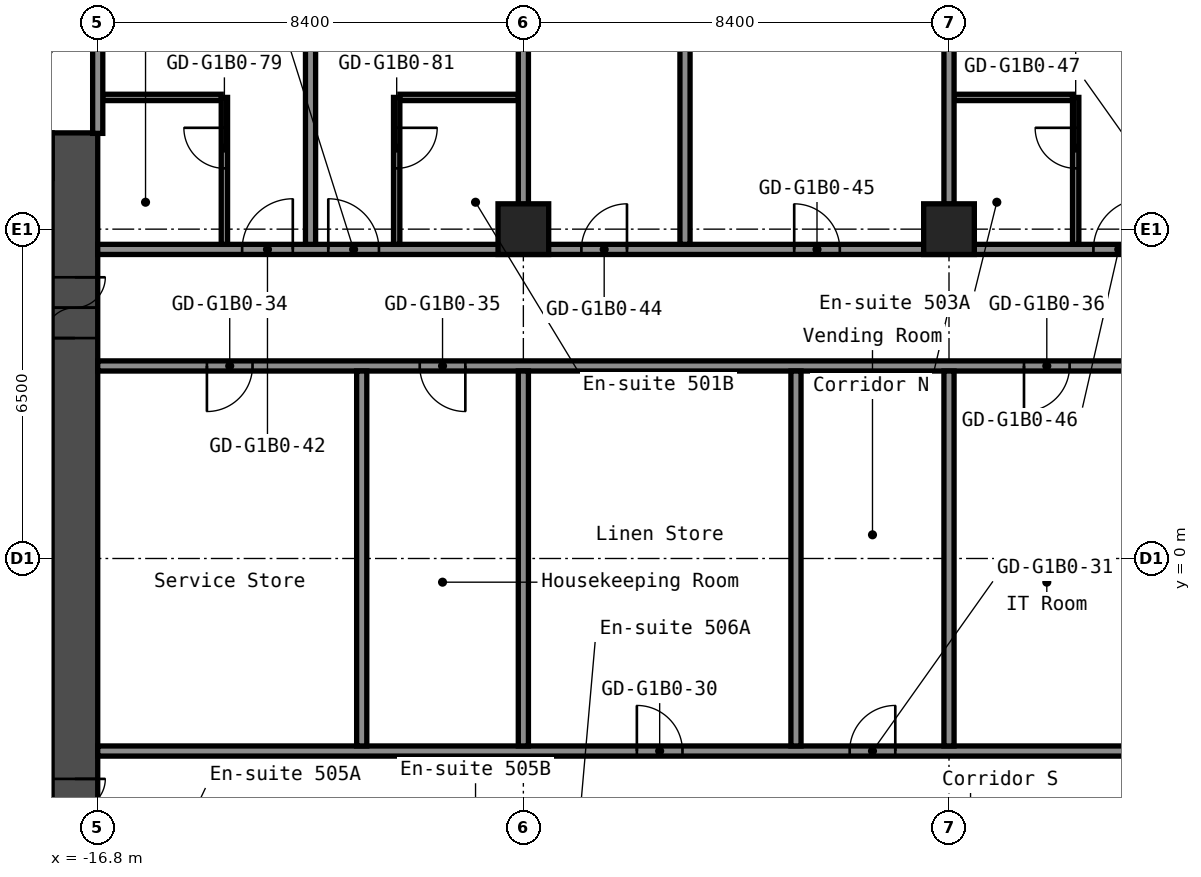
"""IFC4 building model, lengths in metres.
Left out: names, types, materials, properties, quantities, classifications, styles, units other than length and angle.
Written with IfcOpenShell. Run it as: python <this file> out.ifc"""

import sys

from ifc_helpers import new_model, si_unit, direction, frame, frame_2d, origin, origin_2d, place, context, subcontext, project, spatial, rectangle, hollow_rectangle, extrude, element, fill, save


model = new_model("IFC4")
c1 = context("Model", 3, precision=1e-05, world=origin(), true_north=direction((0.0, 1.0)))
c2 = subcontext(c1, "Body", "Model", "MODEL_VIEW")
j1 = project(units=[si_unit("LENGTHUNIT", "METRE"), si_unit("PLANEANGLEUNIT", "RADIAN")], contexts=[c1])
p1 = place(None, origin())
s1 = spatial("IfcSite", under=j1, at=p1, CompositionType="ELEMENT")
p2 = place(p1, origin())
s2 = spatial("IfcBuilding", under=s1, at=p2, CompositionType="ELEMENT")
p3 = place(p2, frame((0.0, 0.0, 23.0)))
s3 = spatial("IfcBuildingStorey", under=s2, at=p3, CompositionType="ELEMENT", Elevation=23.0)
for number, where, z_axis, x_axis in (
    (1, (-8.4, 6.5, 0.0), (0.0, 0.0, 1.0), (1.0, 0.0, 0.0)),
    (2, (0.0, 6.5, 0.0), (0.0, 0.0, 1.0), (1.0, 0.0, 0.0)),
):
    element("IfcColumn", number, at=place(p3, frame(where, z_axis=z_axis, x_axis=x_axis)), inside=s3, PredefinedType="COLUMN", context=c2, shape_type="SweptSolid", body=[
        extrude(hollow_rectangle(XDim=1.0, YDim=1.0, WallThickness=0.04, at=origin_2d()), origin(), (0.0, 0.0, 1.0), 2.8),
    ])
p4 = place(p3, frame((-17.25, -8.4, 0.0), z_axis=(0.0, 0.0, 1.0), x_axis=(0.0, 1.0, 0.0)))
e3 = element("IfcWall", 3, at=p4, inside=s3, PredefinedType="SHEAR", context=c2, shape_type="SweptSolid", body=[
    extrude(rectangle(XDim=16.8, YDim=0.9, at=frame_2d((8.4, 0.0))), origin(), (0.0, 0.0, 1.0), 2.8),
])
p5 = place(p4, frame((12.75, 0.0, 0.0)))
e4 = element("IfcOpeningElement", 4, at=p5, cuts=e3, PredefinedType="OPENING", context=c2, shape_type="SweptSolid", body=[
    extrude(rectangle(XDim=1.2, YDim=2.1, at=frame_2d((0.6, 1.05))), frame((0.0, 0.46, 0.0), z_axis=(0.0, -1.0, 0.0), x_axis=(1.0, 0.0, 0.0)), (0.0, 0.0, 1.0), 0.92),
])
p6 = place(p4, frame((2.85, 0.0, 0.0)))
e5 = element("IfcOpeningElement", 5, at=p6, cuts=e3, PredefinedType="OPENING", context=c2, shape_type="SweptSolid", body=[
    extrude(rectangle(XDim=1.2, YDim=2.1, at=frame_2d((0.6, 1.05))), frame((0.0, 0.46, 0.0), z_axis=(0.0, -1.0, 0.0), x_axis=(1.0, 0.0, 0.0)), (0.0, 0.0, 1.0), 0.92),
])
p7 = place(p3, frame((-32.7, 7.95, 0.0), z_axis=(0.0, 0.0, 1.0), x_axis=(1.0, 0.0, 0.0)))
e6 = element("IfcWall", 6, at=p7, inside=s3, PredefinedType="SHEAR", context=c2, shape_type="SweptSolid", body=[
    extrude(rectangle(XDim=15.0, YDim=0.9, at=frame_2d((7.5, 0.0))), origin(), (0.0, 0.0, 1.0), 2.8),
])
p8 = place(p7, frame((3.4, 0.0, 0.0)))
e7 = element("IfcOpeningElement", 7, at=p8, cuts=e6, PredefinedType="OPENING", context=c2, shape_type="SweptSolid", body=[
    extrude(rectangle(XDim=1.2, YDim=2.1, at=frame_2d((0.6, 1.05))), frame((0.0, 0.46, 0.0), z_axis=(0.0, -1.0, 0.0), x_axis=(1.0, 0.0, 0.0)), (0.0, 0.0, 1.0), 0.92),
])
p9 = place(p7, frame((0.75, 0.0, 0.0)))
e8 = element("IfcOpeningElement", 8, at=p9, cuts=e6, PredefinedType="OPENING", context=c2, shape_type="SweptSolid", body=[
    extrude(rectangle(XDim=0.9, YDim=2.1, at=frame_2d((0.45, 1.05))), frame((0.0, 0.46, 0.0), z_axis=(0.0, -1.0, 0.0), x_axis=(1.0, 0.0, 0.0)), (0.0, 0.0, 1.0), 0.92),
])
p10 = place(p3, frame((-16.8, -3.8, 0.0), z_axis=(0.0, 0.0, 1.0), x_axis=(1.0, 0.0, 0.0)))
e9 = element("IfcWall", 9, at=p10, inside=s3, PredefinedType="PARTITIONING", context=c2, shape_type="SweptSolid", body=[
    extrude(rectangle(XDim=33.6, YDim=0.2, at=frame_2d((16.8, 0.0))), origin(), (0.0, 0.0, 1.0), 2.8),
])
p11 = place(p10, frame((10.64, 0.0, 0.0)))
e10 = element("IfcOpeningElement", 10, at=p11, cuts=e9, PredefinedType="OPENING", context=c2, shape_type="SweptSolid", body=[
    extrude(rectangle(XDim=0.9, YDim=2.1, at=frame_2d((0.45, 1.05))), frame((0.0, 0.11, 0.0), z_axis=(0.0, -1.0, 0.0), x_axis=(1.0, 0.0, 0.0)), (0.0, 0.0, 1.0), 0.22),
])
p12 = place(p10, frame((14.84, 0.0, 0.0)))
e11 = element("IfcOpeningElement", 11, at=p12, cuts=e9, PredefinedType="OPENING", context=c2, shape_type="SweptSolid", body=[
    extrude(rectangle(XDim=0.9, YDim=2.1, at=frame_2d((0.45, 1.05))), frame((0.0, 0.11, 0.0), z_axis=(0.0, -1.0, 0.0), x_axis=(1.0, 0.0, 0.0)), (0.0, 0.0, 1.0), 0.22),
])
p13 = place(p10, frame((26.26, 0.0, 0.0)))
e12 = element("IfcOpeningElement", 12, at=p13, cuts=e9, PredefinedType="OPENING", context=c2, shape_type="SweptSolid", body=[
    extrude(rectangle(XDim=0.9, YDim=2.1, at=frame_2d((0.45, 1.05))), frame((0.0, 0.11, 0.0), z_axis=(0.0, -1.0, 0.0), x_axis=(1.0, 0.0, 0.0)), (0.0, 0.0, 1.0), 0.22),
])
p14 = place(p10, frame((30.46, 0.0, 0.0)))
e13 = element("IfcOpeningElement", 13, at=p14, cuts=e9, PredefinedType="OPENING", context=c2, shape_type="SweptSolid", body=[
    extrude(rectangle(XDim=0.9, YDim=2.1, at=frame_2d((0.45, 1.05))), frame((0.0, 0.11, 0.0), z_axis=(0.0, -1.0, 0.0), x_axis=(1.0, 0.0, 0.0)), (0.0, 0.0, 1.0), 0.22),
])
p15 = place(p3, frame((-16.8, 3.8, 0.0), z_axis=(0.0, 0.0, 1.0), x_axis=(1.0, 0.0, 0.0)))
e14 = element("IfcWall", 14, at=p15, inside=s3, PredefinedType="PARTITIONING", context=c2, shape_type="SweptSolid", body=[
    extrude(rectangle(XDim=33.6, YDim=0.2, at=frame_2d((16.8, 0.0))), origin(), (0.0, 0.0, 1.0), 2.8),
])
p16 = place(p15, frame((2.155, 0.0, 0.0)))
e15 = element("IfcOpeningElement", 15, at=p16, cuts=e14, PredefinedType="OPENING", context=c2, shape_type="SweptSolid", body=[
    extrude(rectangle(XDim=0.9, YDim=2.1, at=frame_2d((0.45, 1.05))), frame((0.0, 0.11, 0.0), z_axis=(0.0, -1.0, 0.0), x_axis=(1.0, 0.0, 0.0)), (0.0, 0.0, 1.0), 0.22),
])
p17 = place(p15, frame((6.355, 0.0, 0.0)))
e16 = element("IfcOpeningElement", 16, at=p17, cuts=e14, PredefinedType="OPENING", context=c2, shape_type="SweptSolid", body=[
    extrude(rectangle(XDim=0.9, YDim=2.1, at=frame_2d((0.45, 1.05))), frame((0.0, 0.11, 0.0), z_axis=(0.0, -1.0, 0.0), x_axis=(1.0, 0.0, 0.0)), (0.0, 0.0, 1.0), 0.22),
])
p18 = place(p15, frame((18.28, 0.0, 0.0)))
e17 = element("IfcOpeningElement", 17, at=p18, cuts=e14, PredefinedType="OPENING", context=c2, shape_type="SweptSolid", body=[
    extrude(rectangle(XDim=0.9, YDim=2.1, at=frame_2d((0.45, 1.05))), frame((0.0, 0.11, 0.0), z_axis=(0.0, -1.0, 0.0), x_axis=(1.0, 0.0, 0.0)), (0.0, 0.0, 1.0), 0.22),
])
p19 = place(p15, frame((22.48, 0.0, 0.0)))
e18 = element("IfcOpeningElement", 18, at=p19, cuts=e14, PredefinedType="OPENING", context=c2, shape_type="SweptSolid", body=[
    extrude(rectangle(XDim=0.9, YDim=2.1, at=frame_2d((0.45, 1.05))), frame((0.0, 0.11, 0.0), z_axis=(0.0, -1.0, 0.0), x_axis=(1.0, 0.0, 0.0)), (0.0, 0.0, 1.0), 0.22),
])
p20 = place(p3, frame((-16.8, 6.1, 0.0), z_axis=(0.0, 0.0, 1.0), x_axis=(1.0, 0.0, 0.0)))
e19 = element("IfcWall", 19, at=p20, inside=s3, PredefinedType="PARTITIONING", context=c2, shape_type="SweptSolid", body=[
    extrude(rectangle(XDim=33.6, YDim=0.2, at=frame_2d((16.8, 0.0))), origin(), (0.0, 0.0, 1.0), 2.8),
])
p21 = place(p20, frame((2.85, 0.0, 0.0)))
e20 = element("IfcOpeningElement", 20, at=p21, cuts=e19, PredefinedType="OPENING", context=c2, shape_type="SweptSolid", body=[
    extrude(rectangle(XDim=1.0, YDim=2.1, at=frame_2d((0.5, 1.05))), frame((0.0, 0.11, 0.0), z_axis=(0.0, -1.0, 0.0), x_axis=(1.0, 0.0, 0.0)), (0.0, 0.0, 1.0), 0.22),
])
p22 = place(p20, frame((4.55, 0.0, 0.0)))
e21 = element("IfcOpeningElement", 21, at=p22, cuts=e19, PredefinedType="OPENING", context=c2, shape_type="SweptSolid", body=[
    extrude(rectangle(XDim=1.0, YDim=2.1, at=frame_2d((0.5, 1.05))), frame((0.0, 0.11, 0.0), z_axis=(0.0, -1.0, 0.0), x_axis=(1.0, 0.0, 0.0)), (0.0, 0.0, 1.0), 0.22),
])
p23 = place(p20, frame((9.545, 0.0, 0.0)))
e22 = element("IfcOpeningElement", 22, at=p23, cuts=e19, PredefinedType="OPENING", context=c2, shape_type="SweptSolid", body=[
    extrude(rectangle(XDim=0.9, YDim=2.1, at=frame_2d((0.45, 1.05))), frame((0.0, 0.11, 0.0), z_axis=(0.0, -1.0, 0.0), x_axis=(1.0, 0.0, 0.0)), (0.0, 0.0, 1.0), 0.22),
])
p24 = place(p20, frame((13.745, 0.0, 0.0)))
e23 = element("IfcOpeningElement", 23, at=p24, cuts=e19, PredefinedType="OPENING", context=c2, shape_type="SweptSolid", body=[
    extrude(rectangle(XDim=0.9, YDim=2.1, at=frame_2d((0.45, 1.05))), frame((0.0, 0.11, 0.0), z_axis=(0.0, -1.0, 0.0), x_axis=(1.0, 0.0, 0.0)), (0.0, 0.0, 1.0), 0.22),
])
p25 = place(p20, frame((19.65, 0.0, 0.0)))
e24 = element("IfcOpeningElement", 24, at=p25, cuts=e19, PredefinedType="OPENING", context=c2, shape_type="SweptSolid", body=[
    extrude(rectangle(XDim=1.0, YDim=2.1, at=frame_2d((0.5, 1.05))), frame((0.0, 0.11, 0.0), z_axis=(0.0, -1.0, 0.0), x_axis=(1.0, 0.0, 0.0)), (0.0, 0.0, 1.0), 0.22),
])
p26 = place(p20, frame((21.35, 0.0, 0.0)))
e25 = element("IfcOpeningElement", 25, at=p26, cuts=e19, PredefinedType="OPENING", context=c2, shape_type="SweptSolid", body=[
    extrude(rectangle(XDim=1.0, YDim=2.1, at=frame_2d((0.5, 1.05))), frame((0.0, 0.11, 0.0), z_axis=(0.0, -1.0, 0.0), x_axis=(1.0, 0.0, 0.0)), (0.0, 0.0, 1.0), 0.22),
])
p27 = place(p20, frame((28.05, 0.0, 0.0)))
e26 = element("IfcOpeningElement", 26, at=p27, cuts=e19, PredefinedType="OPENING", context=c2, shape_type="SweptSolid", body=[
    extrude(rectangle(XDim=1.0, YDim=2.1, at=frame_2d((0.5, 1.05))), frame((0.0, 0.11, 0.0), z_axis=(0.0, -1.0, 0.0), x_axis=(1.0, 0.0, 0.0)), (0.0, 0.0, 1.0), 0.22),
])
p28 = place(p20, frame((29.75, 0.0, 0.0)))
e27 = element("IfcOpeningElement", 27, at=p28, cuts=e19, PredefinedType="OPENING", context=c2, shape_type="SweptSolid", body=[
    extrude(rectangle(XDim=1.0, YDim=2.1, at=frame_2d((0.5, 1.05))), frame((0.0, 0.11, 0.0), z_axis=(0.0, -1.0, 0.0), x_axis=(1.0, 0.0, 0.0)), (0.0, 0.0, 1.0), 0.22),
])
for number, where, z_axis, x_axis in (
    (28, (-16.7, 9.1, 0.0), (0.0, 0.0, 1.0), (1.0, 0.0, 0.0)),
    (29, (-10.837, 9.1, 0.0), (0.0, 0.0, 1.0), (1.0, 0.0, 0.0)),
    (30, (0.1, 9.1, 0.0), (0.0, 0.0, 1.0), (1.0, 0.0, 0.0)),
):
    element("IfcWall", number, at=place(p3, frame(where, z_axis=z_axis, x_axis=x_axis)), inside=s3, PredefinedType="PARTITIONING", context=c2, shape_type="SweptSolid", body=[
        extrude(rectangle(XDim=2.337, YDim=0.125, at=frame_2d((1.169, 0.0))), origin(), (0.0, 0.0, 1.0), 2.8),
    ])
p29 = place(p3, frame((-16.8, 8.39, 0.0), z_axis=(0.0, 0.0, 1.0), x_axis=(0.0, 1.0, 0.0)))
e31 = element("IfcWall", 31, at=p29, inside=s3, PredefinedType="PARTITIONING", context=c2, shape_type="SweptSolid", body=[
    extrude(rectangle(XDim=11.91, YDim=0.2, at=frame_2d((5.955, 0.0))), origin(), (0.0, 0.0, 1.0), 2.8),
])
p30 = place(p3, frame((-14.3, 6.2, 0.0), z_axis=(0.0, 0.0, 1.0), x_axis=(0.0, 1.0, 0.0)))
e32 = element("IfcWall", 32, at=p30, inside=s3, PredefinedType="PARTITIONING", context=c2, shape_type="SweptSolid", body=[
    extrude(rectangle(XDim=2.9, YDim=0.125, at=frame_2d((1.45, 0.0))), origin(), (0.0, 0.0, 1.0), 2.8),
])
p31 = place(p30, frame((1.5, 0.0, 0.0)))
e33 = element("IfcOpeningElement", 33, at=p31, cuts=e32, PredefinedType="OPENING", context=c2, shape_type="SweptSolid", body=[
    extrude(rectangle(XDim=0.8, YDim=2.1, at=frame_2d((0.4, 1.05))), frame((0.0, 0.073, 0.0), z_axis=(0.0, -1.0, 0.0), x_axis=(1.0, 0.0, 0.0)), (0.0, 0.0, 1.0), 0.145),
])
p32 = place(p3, frame((-12.6, 6.2, 0.0), z_axis=(0.0, 0.0, 1.0), x_axis=(0.0, 1.0, 0.0)))
e34 = element("IfcWall", 34, at=p32, inside=s3, PredefinedType="PARTITIONING", context=c2, shape_type="SweptSolid", body=[
    extrude(rectangle(XDim=14.1, YDim=0.2, at=frame_2d((7.05, 0.0))), origin(), (0.0, 0.0, 1.0), 2.8),
])
p33 = place(p3, frame((-11.59, -3.7, 0.0), z_axis=(0.0, 0.0, 1.0), x_axis=(0.0, 1.0, 0.0)))
e35 = element("IfcWall", 35, at=p33, inside=s3, PredefinedType="PARTITIONING", context=c2, shape_type="SweptSolid", body=[
    extrude(rectangle(XDim=7.4, YDim=0.2, at=frame_2d((3.7, 0.0))), origin(), (0.0, 0.0, 1.0), 2.8),
])
p34 = place(p3, frame((-10.9, 6.2, 0.0), z_axis=(0.0, 0.0, 1.0), x_axis=(0.0, 1.0, 0.0)))
e36 = element("IfcWall", 36, at=p34, inside=s3, PredefinedType="PARTITIONING", context=c2, shape_type="SweptSolid", body=[
    extrude(rectangle(XDim=2.9, YDim=0.125, at=frame_2d((1.45, 0.0))), origin(), (0.0, 0.0, 1.0), 2.8),
])
p35 = place(p34, frame((1.5, 0.0, 0.0)))
e37 = element("IfcOpeningElement", 37, at=p35, cuts=e36, PredefinedType="OPENING", context=c2, shape_type="SweptSolid", body=[
    extrude(rectangle(XDim=0.8, YDim=2.1, at=frame_2d((0.4, 1.05))), frame((0.0, 0.073, 0.0), z_axis=(0.0, -1.0, 0.0), x_axis=(1.0, 0.0, 0.0)), (0.0, 0.0, 1.0), 0.145),
])
p36 = place(p3, frame((-8.4, -3.7, 0.0), z_axis=(0.0, 0.0, 1.0), x_axis=(0.0, 1.0, 0.0)))
e38 = element("IfcWall", 38, at=p36, inside=s3, PredefinedType="PARTITIONING", context=c2, shape_type="SweptSolid", body=[
    extrude(rectangle(XDim=7.4, YDim=0.2, at=frame_2d((3.7, 0.0))), origin(), (0.0, 0.0, 1.0), 2.8),
])
p37 = place(p3, frame((-8.4, 6.99, 0.0), z_axis=(0.0, 0.0, 1.0), x_axis=(0.0, 1.0, 0.0)))
e39 = element("IfcWall", 39, at=p37, inside=s3, PredefinedType="PARTITIONING", context=c2, shape_type="SweptSolid", body=[
    extrude(rectangle(XDim=13.31, YDim=0.2, at=frame_2d((6.655, 0.0))), origin(), (0.0, 0.0, 1.0), 2.8),
])
p38 = place(p3, frame((-5.21, 6.2, 0.0), z_axis=(0.0, 0.0, 1.0), x_axis=(0.0, 1.0, 0.0)))
e40 = element("IfcWall", 40, at=p38, inside=s3, PredefinedType="PARTITIONING", context=c2, shape_type="SweptSolid", body=[
    extrude(rectangle(XDim=14.1, YDim=0.2, at=frame_2d((7.05, 0.0))), origin(), (0.0, 0.0, 1.0), 2.8),
])
for number, where, z_axis, x_axis in (
    (41, (-3.02, -3.7, 0.0), (0.0, 0.0, 1.0), (0.0, 1.0, 0.0)),
    (42, (0.0, -3.7, 0.0), (0.0, 0.0, 1.0), (0.0, 1.0, 0.0)),
):
    element("IfcWall", number, at=place(p3, frame(where, z_axis=z_axis, x_axis=x_axis)), inside=s3, PredefinedType="PARTITIONING", context=c2, shape_type="SweptSolid", body=[
        extrude(rectangle(XDim=7.4, YDim=0.2, at=frame_2d((3.7, 0.0))), origin(), (0.0, 0.0, 1.0), 2.8),
    ])
p39 = place(p3, frame((0.0, 6.99, 0.0), z_axis=(0.0, 0.0, 1.0), x_axis=(0.0, 1.0, 0.0)))
e43 = element("IfcWall", 43, at=p39, inside=s3, PredefinedType="PARTITIONING", context=c2, shape_type="SweptSolid", body=[
    extrude(rectangle(XDim=13.31, YDim=0.2, at=frame_2d((6.655, 0.0))), origin(), (0.0, 0.0, 1.0), 2.8),
])
p40 = place(p3, frame((2.5, 6.2, 0.0), z_axis=(0.0, 0.0, 1.0), x_axis=(0.0, 1.0, 0.0)))
e44 = element("IfcWall", 44, at=p40, inside=s3, PredefinedType="PARTITIONING", context=c2, shape_type="SweptSolid", body=[
    extrude(rectangle(XDim=2.9, YDim=0.125, at=frame_2d((1.45, 0.0))), origin(), (0.0, 0.0, 1.0), 2.8),
])
p41 = place(p40, frame((1.5, 0.0, 0.0)))
e45 = element("IfcOpeningElement", 45, at=p41, cuts=e44, PredefinedType="OPENING", context=c2, shape_type="SweptSolid", body=[
    extrude(rectangle(XDim=0.8, YDim=2.1, at=frame_2d((0.4, 1.05))), frame((0.0, 0.073, 0.0), z_axis=(0.0, -1.0, 0.0), x_axis=(1.0, 0.0, 0.0)), (0.0, 0.0, 1.0), 0.145),
])
p42 = place(p5, origin())
e46 = element("IfcDoor", 46, at=p42, inside=s3, OperationType="DOUBLE_DOOR_SINGLE_SWING", PredefinedType="DOOR", context=c2, shape_type="SweptSolid", body=[
    extrude(rectangle(XDim=1.2, YDim=2.1, at=frame_2d((0.6, 1.05))), frame((0.0, 0.025, 0.0), z_axis=(0.0, -1.0, 0.0), x_axis=(1.0, 0.0, 0.0)), (0.0, 0.0, 1.0), 0.05),
])
fill(e4, e46)
p43 = place(p6, origin())
e47 = element("IfcDoor", 47, at=p43, inside=s3, OperationType="DOUBLE_DOOR_SINGLE_SWING", PredefinedType="DOOR", context=c2, shape_type="SweptSolid", body=[
    extrude(rectangle(XDim=1.2, YDim=2.1, at=frame_2d((0.6, 1.05))), frame((0.0, 0.025, 0.0), z_axis=(0.0, -1.0, 0.0), x_axis=(1.0, 0.0, 0.0)), (0.0, 0.0, 1.0), 0.05),
])
fill(e5, e47)
p44 = place(p11, origin())
e48 = element("IfcDoor", 48, at=p44, inside=s3, OperationType="SINGLE_SWING_RIGHT", PredefinedType="DOOR", context=c2, shape_type="SweptSolid", body=[
    extrude(rectangle(XDim=0.9, YDim=2.1, at=frame_2d((0.45, 1.05))), frame((0.0, 0.025, 0.0), z_axis=(0.0, -1.0, 0.0), x_axis=(1.0, 0.0, 0.0)), (0.0, 0.0, 1.0), 0.05),
])
fill(e10, e48)
p45 = place(p12, origin())
e49 = element("IfcDoor", 49, at=p45, inside=s3, OperationType="SINGLE_SWING_LEFT", PredefinedType="DOOR", context=c2, shape_type="SweptSolid", body=[
    extrude(rectangle(XDim=0.9, YDim=2.1, at=frame_2d((0.45, 1.05))), frame((0.0, 0.025, 0.0), z_axis=(0.0, -1.0, 0.0), x_axis=(1.0, 0.0, 0.0)), (0.0, 0.0, 1.0), 0.05),
])
fill(e11, e49)
p46 = place(p16, origin())
e50 = element("IfcDoor", 50, at=p46, inside=s3, OperationType="SINGLE_SWING_LEFT", PredefinedType="DOOR", context=c2, shape_type="SweptSolid", body=[
    extrude(rectangle(XDim=0.9, YDim=2.1, at=frame_2d((0.45, 1.05))), frame((0.0, 0.025, 0.0), z_axis=(0.0, -1.0, 0.0), x_axis=(1.0, 0.0, 0.0)), (0.0, 0.0, 1.0), 0.05),
])
fill(e15, e50)
p47 = place(p17, origin())
e51 = element("IfcDoor", 51, at=p47, inside=s3, OperationType="SINGLE_SWING_RIGHT", PredefinedType="DOOR", context=c2, shape_type="SweptSolid", body=[
    extrude(rectangle(XDim=0.9, YDim=2.1, at=frame_2d((0.45, 1.05))), frame((0.0, 0.025, 0.0), z_axis=(0.0, -1.0, 0.0), x_axis=(1.0, 0.0, 0.0)), (0.0, 0.0, 1.0), 0.05),
])
fill(e16, e51)
p48 = place(p18, origin())
e52 = element("IfcDoor", 52, at=p48, inside=s3, OperationType="SINGLE_SWING_LEFT", PredefinedType="DOOR", context=c2, shape_type="SweptSolid", body=[
    extrude(rectangle(XDim=0.9, YDim=2.1, at=frame_2d((0.45, 1.05))), frame((0.0, 0.025, 0.0), z_axis=(0.0, -1.0, 0.0), x_axis=(1.0, 0.0, 0.0)), (0.0, 0.0, 1.0), 0.05),
])
fill(e17, e52)
p49 = place(p21, origin())
e53 = element("IfcDoor", 53, at=p49, inside=s3, OperationType="SINGLE_SWING_LEFT", PredefinedType="DOOR", context=c2, shape_type="SweptSolid", body=[
    extrude(rectangle(XDim=1.0, YDim=2.1, at=frame_2d((0.5, 1.05))), frame((0.0, 0.025, 0.0), z_axis=(0.0, -1.0, 0.0), x_axis=(1.0, 0.0, 0.0)), (0.0, 0.0, 1.0), 0.05),
])
fill(e20, e53)
p50 = place(p22, origin())
e54 = element("IfcDoor", 54, at=p50, inside=s3, OperationType="SINGLE_SWING_RIGHT", PredefinedType="DOOR", context=c2, shape_type="SweptSolid", body=[
    extrude(rectangle(XDim=1.0, YDim=2.1, at=frame_2d((0.5, 1.05))), frame((0.0, 0.025, 0.0), z_axis=(0.0, -1.0, 0.0), x_axis=(1.0, 0.0, 0.0)), (0.0, 0.0, 1.0), 0.05),
])
fill(e21, e54)
p51 = place(p23, origin())
e55 = element("IfcDoor", 55, at=p51, inside=s3, OperationType="SINGLE_SWING_LEFT", PredefinedType="DOOR", context=c2, shape_type="SweptSolid", body=[
    extrude(rectangle(XDim=0.9, YDim=2.1, at=frame_2d((0.45, 1.05))), frame((0.0, 0.025, 0.0), z_axis=(0.0, -1.0, 0.0), x_axis=(1.0, 0.0, 0.0)), (0.0, 0.0, 1.0), 0.05),
])
fill(e22, e55)
p52 = place(p24, origin())
e56 = element("IfcDoor", 56, at=p52, inside=s3, OperationType="SINGLE_SWING_RIGHT", PredefinedType="DOOR", context=c2, shape_type="SweptSolid", body=[
    extrude(rectangle(XDim=0.9, YDim=2.1, at=frame_2d((0.45, 1.05))), frame((0.0, 0.025, 0.0), z_axis=(0.0, -1.0, 0.0), x_axis=(1.0, 0.0, 0.0)), (0.0, 0.0, 1.0), 0.05),
])
fill(e23, e56)
p53 = place(p25, origin())
e57 = element("IfcDoor", 57, at=p53, inside=s3, OperationType="SINGLE_SWING_LEFT", PredefinedType="DOOR", context=c2, shape_type="SweptSolid", body=[
    extrude(rectangle(XDim=1.0, YDim=2.1, at=frame_2d((0.5, 1.05))), frame((0.0, 0.025, 0.0), z_axis=(0.0, -1.0, 0.0), x_axis=(1.0, 0.0, 0.0)), (0.0, 0.0, 1.0), 0.05),
])
fill(e24, e57)
p54 = place(p31, origin())
e58 = element("IfcDoor", 58, at=p54, inside=s3, OperationType="SINGLE_SWING_LEFT", PredefinedType="DOOR", context=c2, shape_type="SweptSolid", body=[
    extrude(rectangle(XDim=0.8, YDim=2.1, at=frame_2d((0.4, 1.05))), frame((0.0, 0.025, 0.0), z_axis=(0.0, -1.0, 0.0), x_axis=(1.0, 0.0, 0.0)), (0.0, 0.0, 1.0), 0.05),
])
fill(e33, e58)
p55 = place(p35, origin())
e59 = element("IfcDoor", 59, at=p55, inside=s3, OperationType="SINGLE_SWING_RIGHT", PredefinedType="DOOR", context=c2, shape_type="SweptSolid", body=[
    extrude(rectangle(XDim=0.8, YDim=2.1, at=frame_2d((0.4, 1.05))), frame((0.0, 0.025, 0.0), z_axis=(0.0, -1.0, 0.0), x_axis=(1.0, 0.0, 0.0)), (0.0, 0.0, 1.0), 0.05),
])
fill(e37, e59)
p56 = place(p41, origin())
e60 = element("IfcDoor", 60, at=p56, inside=s3, OperationType="SINGLE_SWING_LEFT", PredefinedType="DOOR", context=c2, shape_type="SweptSolid", body=[
    extrude(rectangle(XDim=0.8, YDim=2.1, at=frame_2d((0.4, 1.05))), frame((0.0, 0.025, 0.0), z_axis=(0.0, -1.0, 0.0), x_axis=(1.0, 0.0, 0.0)), (0.0, 0.0, 1.0), 0.05),
])
fill(e45, e60)
save(model, sys.argv[1])
